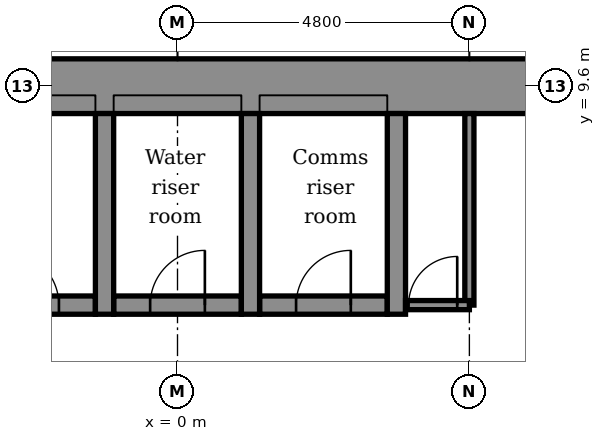
"""IFC4 building model, lengths in metres.
Left out: names, types, materials, properties, quantities, classifications, styles, units other than length and angle.
Written with IfcOpenShell. Run it as: python <this file> out.ifc"""

import sys

from ifc_helpers import new_model, si_unit, direction, frame, frame_2d, origin, place, context, subcontext, project, spatial, rectangle, extrude, element, fill, save


model = new_model("IFC4")
c1 = context("Model", 3, precision=1e-05, world=origin(), true_north=direction((0.0, 1.0)))
c2 = subcontext(c1, "Body", "Model", "MODEL_VIEW")
j1 = project(units=[si_unit("LENGTHUNIT", "METRE"), si_unit("PLANEANGLEUNIT", "RADIAN")], contexts=[c1])
p1 = place(None, origin())
s1 = spatial("IfcSite", under=j1, at=p1, CompositionType="ELEMENT")
p2 = place(p1, origin())
s2 = spatial("IfcBuilding", under=s1, at=p2, CompositionType="ELEMENT")
p3 = place(p2, frame((0.0, 0.0, 127.4)))
s3 = spatial("IfcBuildingStorey", under=s2, at=p3, CompositionType="ELEMENT", Elevation=127.4)
p4 = place(p3, frame((-3.45, 6.0, -0.3), z_axis=(0.0, 0.0, 1.0), x_axis=(1.0, 0.0, 0.0)))
e1 = element("IfcWall", 1, at=p4, inside=s3, PredefinedType="STANDARD", context=c2, shape_type="SweptSolid", body=[
    extrude(rectangle(XDim=2.1, YDim=0.3, at=frame_2d((1.05, 0.0))), origin(), (0.0, 0.0, 1.0), 6.15),
])
p5 = place(p4, frame((0.6, 0.0, 0.3)))
e2 = element("IfcOpeningElement", 2, at=p5, cuts=e1, PredefinedType="OPENING", context=c2, shape_type="SweptSolid", body=[
    extrude(rectangle(XDim=0.9, YDim=2.1, at=frame_2d((0.45, 1.05))), frame((0.0, 0.16, 0.0), z_axis=(0.0, -1.0, 0.0), x_axis=(1.0, 0.0, 0.0)), (0.0, 0.0, 1.0), 0.32),
])
p6 = place(p3, frame((-1.05, 6.0, -0.3), z_axis=(0.0, 0.0, 1.0), x_axis=(1.0, 0.0, 0.0)))
e3 = element("IfcWall", 3, at=p6, inside=s3, PredefinedType="STANDARD", context=c2, shape_type="SweptSolid", body=[
    extrude(rectangle(XDim=2.1, YDim=0.3, at=frame_2d((1.05, 0.0))), origin(), (0.0, 0.0, 1.0), 6.15),
])
p7 = place(p6, frame((0.6, 0.0, 0.3)))
e4 = element("IfcOpeningElement", 4, at=p7, cuts=e3, PredefinedType="OPENING", context=c2, shape_type="SweptSolid", body=[
    extrude(rectangle(XDim=0.9, YDim=2.1, at=frame_2d((0.45, 1.05))), frame((0.0, 0.16, 0.0), z_axis=(0.0, -1.0, 0.0), x_axis=(1.0, 0.0, 0.0)), (0.0, 0.0, 1.0), 0.32),
])
p8 = place(p3, frame((1.35, 6.0, -0.3), z_axis=(0.0, 0.0, 1.0), x_axis=(1.0, 0.0, 0.0)))
e5 = element("IfcWall", 5, at=p8, inside=s3, PredefinedType="STANDARD", context=c2, shape_type="SweptSolid", body=[
    extrude(rectangle(XDim=2.1, YDim=0.3, at=frame_2d((1.05, 0.0))), origin(), (0.0, 0.0, 1.0), 6.15),
])
p9 = place(p8, frame((0.6, 0.0, 0.3)))
e6 = element("IfcOpeningElement", 6, at=p9, cuts=e5, PredefinedType="OPENING", context=c2, shape_type="SweptSolid", body=[
    extrude(rectangle(XDim=0.9, YDim=2.1, at=frame_2d((0.45, 1.05))), frame((0.0, 0.16, 0.0), z_axis=(0.0, -1.0, 0.0), x_axis=(1.0, 0.0, 0.0)), (0.0, 0.0, 1.0), 0.32),
])
p10 = place(p3, frame((-5.25, 9.6, -0.3), z_axis=(0.0, 0.0, 1.0), x_axis=(1.0, 0.0, 0.0)))
e7 = element("IfcWall", 7, at=p10, inside=s3, PredefinedType="SHEAR", context=c2, shape_type="SweptSolid", body=[
    extrude(rectangle(XDim=14.4, YDim=0.9, at=frame_2d((7.2, 0.0))), origin(), (0.0, 0.0, 1.0), 6.15),
])
p11 = place(p10, frame((0.6, 0.0, 0.3)))
e8 = element("IfcOpeningElement", 8, at=p11, cuts=e7, PredefinedType="OPENING", context=c2, shape_type="SweptSolid", body=[
    extrude(rectangle(XDim=0.9, YDim=2.1, at=frame_2d((0.45, 1.05))), frame((0.0, 0.46, 0.0), z_axis=(0.0, -1.0, 0.0), x_axis=(1.0, 0.0, 0.0)), (0.0, 0.0, 1.0), 0.92),
])
for number, where, z_axis, x_axis in (
    (9, (-1.2, 5.85, -0.3), (0.0, 0.0, 1.0), (0.0, 1.0, 0.0)),
    (10, (1.2, 5.85, -0.3), (0.0, 0.0, 1.0), (0.0, 1.0, 0.0)),
    (11, (3.6, 5.85, -0.3), (0.0, 0.0, 1.0), (0.0, 1.0, 0.0)),
):
    element("IfcWall", number, at=place(p3, frame(where, z_axis=z_axis, x_axis=x_axis)), inside=s3, PredefinedType="STANDARD", context=c2, shape_type="SweptSolid", body=[
        extrude(rectangle(XDim=3.3, YDim=0.3, at=frame_2d((1.65, 0.0))), origin(), (0.0, 0.0, 1.0), 6.15),
    ])
p12 = place(p3, frame((4.8, 6.0, 0.0), z_axis=(0.0, 0.0, 1.0), x_axis=(0.0, 1.0, 0.0)))
e12 = element("IfcWall", 12, at=p12, inside=s3, PredefinedType="PARTITIONING", context=c2, shape_type="SweptSolid", body=[
    extrude(rectangle(XDim=3.15, YDim=0.15, at=frame_2d((1.575, 0.0))), origin(), (0.0, 0.0, 1.0), 5.85),
])
p13 = place(p3, frame((3.75, 6.0, 0.0), z_axis=(0.0, 0.0, 1.0), x_axis=(1.0, 0.0, 0.0)))
e13 = element("IfcWall", 13, at=p13, inside=s3, PredefinedType="PARTITIONING", context=c2, shape_type="SweptSolid", body=[
    extrude(rectangle(XDim=1.05, YDim=0.15, at=frame_2d((0.525, 0.0))), origin(), (0.0, 0.0, 1.0), 5.85),
])
p14 = place(p13, frame((0.05, 0.0, 0.0)))
e14 = element("IfcOpeningElement", 14, at=p14, cuts=e13, PredefinedType="OPENING", context=c2, shape_type="SweptSolid", body=[
    extrude(rectangle(XDim=0.8, YDim=2.1, at=frame_2d((0.4, 1.05))), frame((0.0, 0.085, 0.0), z_axis=(0.0, -1.0, 0.0), x_axis=(1.0, 0.0, 0.0)), (0.0, 0.0, 1.0), 0.17),
])
p15 = place(p14, origin())
e15 = element("IfcDoor", 15, at=p15, inside=s3, OperationType="SINGLE_SWING_RIGHT", PredefinedType="DOOR", context=c2, shape_type="SweptSolid", body=[
    extrude(rectangle(XDim=0.8, YDim=2.1, at=frame_2d((0.4, 1.05))), frame((0.0, 0.025, 0.0), z_axis=(0.0, -1.0, 0.0), x_axis=(1.0, 0.0, 0.0)), (0.0, 0.0, 1.0), 0.05),
])
fill(e14, e15)
p16 = place(p5, origin())
e16 = element("IfcDoor", 16, at=p16, inside=s3, OperationType="SINGLE_SWING_LEFT", PredefinedType="DOOR", context=c2, shape_type="SweptSolid", body=[
    extrude(rectangle(XDim=0.9, YDim=2.1, at=frame_2d((0.45, 1.05))), frame((0.0, 0.025, 0.0), z_axis=(0.0, -1.0, 0.0), x_axis=(1.0, 0.0, 0.0)), (0.0, 0.0, 1.0), 0.05),
])
fill(e2, e16)
p17 = place(p7, origin())
e17 = element("IfcDoor", 17, at=p17, inside=s3, OperationType="SINGLE_SWING_RIGHT", PredefinedType="DOOR", context=c2, shape_type="SweptSolid", body=[
    extrude(rectangle(XDim=0.9, YDim=2.1, at=frame_2d((0.45, 1.05))), frame((0.0, 0.025, 0.0), z_axis=(0.0, -1.0, 0.0), x_axis=(1.0, 0.0, 0.0)), (0.0, 0.0, 1.0), 0.05),
])
fill(e4, e17)
p18 = place(p9, origin())
e18 = element("IfcDoor", 18, at=p18, inside=s3, OperationType="SINGLE_SWING_RIGHT", PredefinedType="DOOR", context=c2, shape_type="SweptSolid", body=[
    extrude(rectangle(XDim=0.9, YDim=2.1, at=frame_2d((0.45, 1.05))), frame((0.0, 0.025, 0.0), z_axis=(0.0, -1.0, 0.0), x_axis=(1.0, 0.0, 0.0)), (0.0, 0.0, 1.0), 0.05),
])
fill(e6, e18)
save(model, sys.argv[1])
